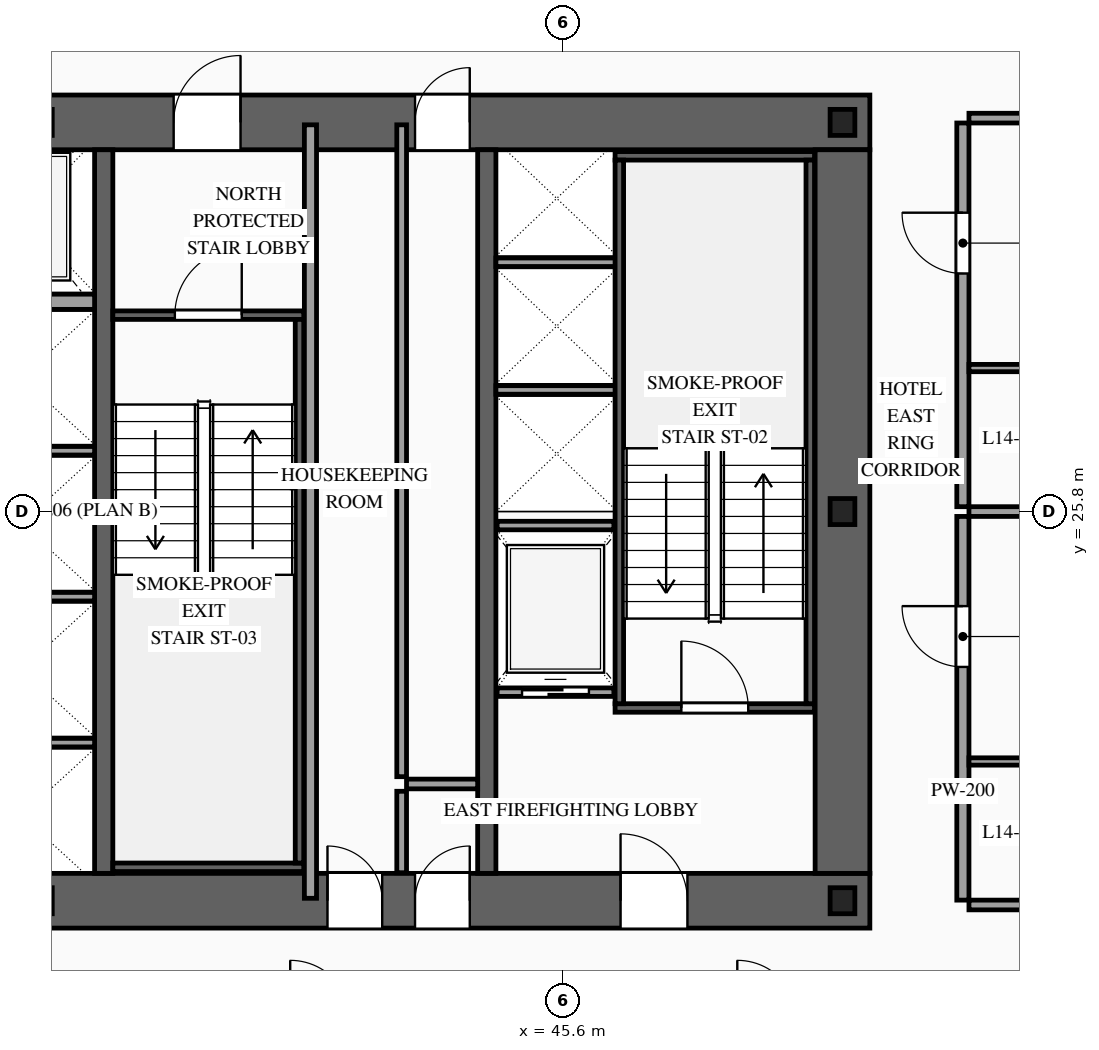
"""IFC4 building model, lengths in metres.
Left out: names, types, materials, properties, quantities, classifications, styles, units other than length and angle.
Written with IfcOpenShell. Run it as: python <this file> out.ifc"""

import sys

from ifc_helpers import new_model, si_unit, direction, frame, frame_2d, origin, origin_2d, place, context, subcontext, project, spatial, rectangle, i_section, extrude, source, transform, mapped, element, fill, save


model = new_model("IFC4")
c1 = context("Model", 3, precision=1e-05, world=origin(), true_north=direction((0.0, 1.0)))
c2 = subcontext(c1, "Body", "Model", "MODEL_VIEW")
j1 = project(units=[si_unit("LENGTHUNIT", "METRE"), si_unit("PLANEANGLEUNIT", "RADIAN")], contexts=[c1])
p1 = place(None, origin())
s1 = spatial("IfcSite", under=j1, at=p1, CompositionType="ELEMENT")
p2 = place(p1, origin())
s2 = spatial("IfcBuilding", under=s1, at=p2, CompositionType="ELEMENT")
p3 = place(p2, frame((0.0, 0.0, 56.8)))
s3 = spatial("IfcBuildingStorey", under=s2, at=p3, CompositionType="ELEMENT", Elevation=56.8)
p4 = place(p3, frame((23.35, 19.4, 0.0), z_axis=(0.0, 0.0, 1.0), x_axis=(1.0, 0.0, 0.0)))
e1 = element("IfcWall", 1, at=p4, inside=s3, PredefinedType="SHEAR", context=c2, shape_type="SweptSolid", body=[
    extrude(rectangle(XDim=27.3, YDim=0.9, at=frame_2d((13.65, 0.0))), origin(), (0.0, 0.0, 1.0), 3.6),
])
p5 = place(p4, frame((2.1, 0.0, 0.0)))
e2 = element("IfcOpeningElement", 2, at=p5, cuts=e1, PredefinedType="OPENING", context=c2, shape_type="SweptSolid", body=[
    extrude(rectangle(XDim=1.1, YDim=2.2, at=frame_2d((0.55, 1.1))), frame((0.0, 0.465, 0.0), z_axis=(0.0, -1.0, 0.0), x_axis=(1.0, 0.0, 0.0)), (0.0, 0.0, 1.0), 0.93),
])
p6 = place(p4, frame((10.0, 0.0, 0.0)))
e3 = element("IfcOpeningElement", 3, at=p6, cuts=e1, PredefinedType="OPENING", context=c2, shape_type="SweptSolid", body=[
    extrude(rectangle(XDim=1.1, YDim=2.2, at=frame_2d((0.55, 1.1))), frame((0.0, 0.465, 0.0), z_axis=(0.0, -1.0, 0.0), x_axis=(1.0, 0.0, 0.0)), (0.0, 0.0, 1.0), 0.93),
])
p7 = place(p4, frame((23.2, 0.0, 0.0)))
e4 = element("IfcOpeningElement", 4, at=p7, cuts=e1, PredefinedType="OPENING", context=c2, shape_type="SweptSolid", body=[
    extrude(rectangle(XDim=1.1, YDim=2.2, at=frame_2d((0.55, 1.1))), frame((0.0, 0.465, 0.0), z_axis=(0.0, -1.0, 0.0), x_axis=(1.0, 0.0, 0.0)), (0.0, 0.0, 1.0), 0.93),
])
p8 = place(p4, frame((19.82, 0.0, 0.0)))
e5 = element("IfcOpeningElement", 5, at=p8, cuts=e1, PredefinedType="OPENING", context=c2, shape_type="SweptSolid", body=[
    extrude(rectangle(XDim=0.9, YDim=2.15, at=frame_2d((0.45, 1.075))), frame((0.0, 0.465, 0.0), z_axis=(0.0, -1.0, 0.0), x_axis=(1.0, 0.0, 0.0)), (0.0, 0.0, 1.0), 0.93),
])
p9 = place(p4, frame((18.38, 0.0, 0.0)))
e6 = element("IfcOpeningElement", 6, at=p9, cuts=e1, PredefinedType="OPENING", context=c2, shape_type="SweptSolid", body=[
    extrude(rectangle(XDim=0.9, YDim=2.15, at=frame_2d((0.45, 1.075))), frame((0.0, 0.465, 0.0), z_axis=(0.0, -1.0, 0.0), x_axis=(1.0, 0.0, 0.0)), (0.0, 0.0, 1.0), 0.93),
])
p10 = place(p3, frame((23.35, 32.2, 0.0), z_axis=(0.0, 0.0, 1.0), x_axis=(1.0, 0.0, 0.0)))
e7 = element("IfcWall", 7, at=p10, inside=s3, PredefinedType="SHEAR", context=c2, shape_type="SweptSolid", body=[
    extrude(rectangle(XDim=27.3, YDim=0.9, at=frame_2d((13.65, 0.0))), origin(), (0.0, 0.0, 1.0), 3.6),
])
p11 = place(p10, frame((4.72, 0.0, 0.0)))
e8 = element("IfcOpeningElement", 8, at=p11, cuts=e7, PredefinedType="OPENING", context=c2, shape_type="SweptSolid", body=[
    extrude(rectangle(XDim=0.9, YDim=2.15, at=frame_2d((0.45, 1.075))), frame((0.0, 0.465, 0.0), z_axis=(0.0, -1.0, 0.0), x_axis=(1.0, 0.0, 0.0)), (0.0, 0.0, 1.0), 0.93),
])
p12 = place(p10, frame((10.0, 0.0, 0.0)))
e9 = element("IfcOpeningElement", 9, at=p12, cuts=e7, PredefinedType="OPENING", context=c2, shape_type="SweptSolid", body=[
    extrude(rectangle(XDim=1.1, YDim=2.2, at=frame_2d((0.55, 1.1))), frame((0.0, 0.465, 0.0), z_axis=(0.0, -1.0, 0.0), x_axis=(1.0, 0.0, 0.0)), (0.0, 0.0, 1.0), 0.93),
])
p13 = place(p10, frame((15.85, 0.0, 0.0)))
e10 = element("IfcOpeningElement", 10, at=p13, cuts=e7, PredefinedType="OPENING", context=c2, shape_type="SweptSolid", body=[
    extrude(rectangle(XDim=1.1, YDim=2.2, at=frame_2d((0.55, 1.1))), frame((0.0, 0.465, 0.0), z_axis=(0.0, -1.0, 0.0), x_axis=(1.0, 0.0, 0.0)), (0.0, 0.0, 1.0), 0.93),
])
p14 = place(p10, frame((19.82, 0.0, 0.0)))
e11 = element("IfcOpeningElement", 11, at=p14, cuts=e7, PredefinedType="OPENING", context=c2, shape_type="SweptSolid", body=[
    extrude(rectangle(XDim=0.9, YDim=2.15, at=frame_2d((0.45, 1.075))), frame((0.0, 0.465, 0.0), z_axis=(0.0, -1.0, 0.0), x_axis=(1.0, 0.0, 0.0)), (0.0, 0.0, 1.0), 0.93),
])
m1 = source(origin(), c2, "Body", "SweptSolid", [
    extrude(rectangle(XDim=11.9, YDim=0.9, at=frame_2d((5.95, 0.0))), origin(), (0.0, 0.0, 1.0), 3.6),
])
p15 = place(p3, frame((50.2, 19.85, 0.0), z_axis=(0.0, 0.0, 1.0), x_axis=(0.0, 1.0, 0.0)))
e12 = element("IfcWall", 12, at=p15, inside=s3, PredefinedType="SHEAR", context=c2, shape_type="MappedRepresentation", body=[
    mapped(m1, transform((0.0, 0.0, 0.0), scale=1.0)),
])
m2 = source(origin(), c2, "Body", "SweptSolid", [
    extrude(rectangle(XDim=11.9, YDim=0.3, at=frame_2d((5.95, 0.0))), origin(), (0.0, 0.0, 1.0), 3.6),
])
for number, where, z_axis, x_axis in (
    (13, (38.05, 19.85, 0.0), (0.0, 0.0, 1.0), (0.0, 1.0, 0.0)),
    (14, (44.35, 19.85, 0.0), (0.0, 0.0, 1.0), (0.0, 1.0, 0.0)),
):
    element("IfcWall", number, at=place(p3, frame(where, z_axis=z_axis, x_axis=x_axis)), inside=s3, PredefinedType="SOLIDWALL", context=c2, shape_type="MappedRepresentation", body=[
        mapped(m2, transform((0.0, 0.0, 0.0), scale=1.0)),
    ])
m3 = source(origin(), c2, "Body", "SweptSolid", [
    extrude(i_section(OverallWidth=0.407, OverallDepth=0.428, WebThickness=0.02, FlangeThickness=0.035, at=origin_2d()), origin(), (0.0, 0.0, 1.0), 3.6),
])
for number, where, z_axis, x_axis in (
    (15, (37.0, 19.4, 0.0), (0.0, 0.0, 1.0), (1.0, 0.0, 0.0)),
    (16, (50.2, 19.4, 0.0), (0.0, 0.0, 1.0), (1.0, 0.0, 0.0)),
    (17, (50.2, 25.8, 0.0), (0.0, 0.0, 1.0), (1.0, 0.0, 0.0)),
    (18, (37.0, 32.2, 0.0), (0.0, 0.0, 1.0), (1.0, 0.0, 0.0)),
    (19, (50.2, 32.2, 0.0), (0.0, 0.0, 1.0), (1.0, 0.0, 0.0)),
):
    element("IfcColumn", number, at=place(p3, frame(where, z_axis=z_axis, x_axis=x_axis)), inside=s3, PredefinedType="COLUMN", context=c2, shape_type="MappedRepresentation", body=[
        mapped(m3, transform((0.0, 0.0, 0.0), scale=1.0)),
    ])
p16 = place(p3, frame((44.52, 22.83, 0.0), z_axis=(0.0, 0.0, 1.0), x_axis=(1.0, 0.0, 0.0)))
e20 = element("IfcWall", 20, at=p16, inside=s3, PredefinedType="SOLIDWALL", context=c2, shape_type="SweptSolid", body=[
    extrude(rectangle(XDim=1.92, YDim=0.14, at=frame_2d((0.96, 0.0))), origin(), (0.0, 0.0, 1.0), 3.38),
])
p17 = place(p16, frame((0.41, 0.0, 0.0)))
e21 = element("IfcOpeningElement", 21, at=p17, cuts=e20, PredefinedType="OPENING", context=c2, shape_type="SweptSolid", body=[
    extrude(rectangle(XDim=1.1, YDim=2.2, at=frame_2d((0.55, 1.1))), frame((0.0, 0.085, 0.0), z_axis=(0.0, -1.0, 0.0), x_axis=(1.0, 0.0, 0.0)), (0.0, 0.0, 1.0), 0.17),
])
m4 = source(origin(), c2, "Body", "SweptSolid", [
    extrude(rectangle(XDim=1.92, YDim=0.14, at=frame_2d((0.96, 0.0))), origin(), (0.0, 0.0, 1.0), 3.38),
])
p18 = place(p3, frame((44.52, 25.57, 0.0), z_axis=(0.0, 0.0, 1.0), x_axis=(1.0, 0.0, 0.0)))
e22 = element("IfcWall", 22, at=p18, inside=s3, PredefinedType="SOLIDWALL", context=c2, shape_type="MappedRepresentation", body=[
    mapped(m4, transform((0.0, 0.0, 0.0), scale=1.0)),
])
m5 = source(origin(), c2, "Body", "SweptSolid", [
    extrude(rectangle(XDim=2.4, YDim=0.14, at=frame_2d((1.2, 0.0))), origin(), (0.0, 0.0, 1.0), 3.38),
])
for number, where, z_axis, x_axis in (
    (23, (35.5, 22.0, 0.0), (0.0, 0.0, 1.0), (1.0, 0.0, 0.0)),
    (24, (35.5, 24.4, 0.0), (0.0, 0.0, 1.0), (1.0, 0.0, 0.0)),
    (25, (35.5, 26.8, 0.0), (0.0, 0.0, 1.0), (1.0, 0.0, 0.0)),
):
    element("IfcWall", number, at=place(p3, frame(where, z_axis=z_axis, x_axis=x_axis)), inside=s3, PredefinedType="SOLIDWALL", context=c2, shape_type="MappedRepresentation", body=[
        mapped(m5, transform((0.0, 0.0, 0.0), scale=1.0)),
    ])
m6 = source(origin(), c2, "Body", "SweptSolid", [
    extrude(rectangle(XDim=2.4, YDim=0.25, at=frame_2d((1.2, 0.0))), origin(), (0.0, 0.0, 1.0), 3.38),
])
p19 = place(p3, frame((35.5, 29.25, 0.0), z_axis=(0.0, 0.0, 1.0), x_axis=(1.0, 0.0, 0.0)))
e26 = element("IfcWall", 26, at=p19, inside=s3, PredefinedType="SOLIDWALL", context=c2, shape_type="MappedRepresentation", body=[
    mapped(m6, transform((0.0, 0.0, 0.0), scale=1.0)),
])
m7 = source(origin(), c2, "Body", "SweptSolid", [
    extrude(rectangle(XDim=2.0, YDim=0.14, at=frame_2d((1.0, 0.0))), origin(), (0.0, 0.0, 1.0), 3.38),
])
for number, where, z_axis, x_axis in (
    (27, (44.5, 27.8, 0.0), (0.0, 0.0, 1.0), (1.0, 0.0, 0.0)),
    (28, (44.5, 29.9, 0.0), (0.0, 0.0, 1.0), (1.0, 0.0, 0.0)),
):
    element("IfcWall", number, at=place(p3, frame(where, z_axis=z_axis, x_axis=x_axis)), inside=s3, PredefinedType="SOLIDWALL", context=c2, shape_type="MappedRepresentation", body=[
        mapped(m7, transform((0.0, 0.0, 0.0), scale=1.0)),
    ])
p20 = place(p3, frame((46.46, 22.57, 0.0), z_axis=(0.0, 0.0, 1.0), x_axis=(1.0, 0.0, 0.0)))
e29 = element("IfcWall", 29, at=p20, inside=s3, PredefinedType="SOLIDWALL", context=c2, shape_type="SweptSolid", body=[
    extrude(rectangle(XDim=3.28, YDim=0.14, at=frame_2d((1.64, 0.0))), origin(), (0.0, 0.0, 1.0), 3.38),
])
p21 = place(p20, frame((1.09, 0.0, 0.0)))
e30 = element("IfcOpeningElement", 30, at=p21, cuts=e29, PredefinedType="OPENING", context=c2, shape_type="SweptSolid", body=[
    extrude(rectangle(XDim=1.1, YDim=2.2, at=frame_2d((0.55, 1.1))), frame((0.0, 0.085, 0.0), z_axis=(0.0, -1.0, 0.0), x_axis=(1.0, 0.0, 0.0)), (0.0, 0.0, 1.0), 0.17),
])
m8 = source(origin(), c2, "Body", "SweptSolid", [
    extrude(rectangle(XDim=3.28, YDim=0.14, at=frame_2d((1.64, 0.0))), origin(), (0.0, 0.0, 1.0), 3.38),
])
p22 = place(p3, frame((46.46, 31.65, 0.0), z_axis=(0.0, 0.0, 1.0), x_axis=(1.0, 0.0, 0.0)))
e31 = element("IfcWall", 31, at=p22, inside=s3, PredefinedType="SOLIDWALL", context=c2, shape_type="MappedRepresentation", body=[
    mapped(m8, transform((0.0, 0.0, 0.0), scale=1.0)),
])
m9 = source(origin(), c2, "Body", "SweptSolid", [
    extrude(rectangle(XDim=8.94, YDim=0.14, at=frame_2d((4.47, 0.0))), origin(), (0.0, 0.0, 1.0), 3.38),
])
for number, where, z_axis, x_axis in (
    (32, (46.53, 22.64, 0.0), (0.0, 0.0, 1.0), (0.0, 1.0, 0.0)),
    (33, (49.67, 22.64, 0.0), (0.0, 0.0, 1.0), (0.0, 1.0, 0.0)),
):
    element("IfcWall", number, at=place(p3, frame(where, z_axis=z_axis, x_axis=x_axis)), inside=s3, PredefinedType="SOLIDWALL", context=c2, shape_type="MappedRepresentation", body=[
        mapped(m9, transform((0.0, 0.0, 0.0), scale=1.0)),
    ])
p23 = place(p3, frame((38.2, 29.03, 0.0), z_axis=(0.0, 0.0, 1.0), x_axis=(1.0, 0.0, 0.0)))
e34 = element("IfcWall", 34, at=p23, inside=s3, PredefinedType="SOLIDWALL", context=c2, shape_type="SweptSolid", body=[
    extrude(rectangle(XDim=3.14, YDim=0.14, at=frame_2d((1.57, 0.0))), origin(), (0.0, 0.0, 1.0), 3.38),
])
p24 = place(p23, frame((1.02, 0.0, 0.0)))
e35 = element("IfcOpeningElement", 35, at=p24, cuts=e34, PredefinedType="OPENING", context=c2, shape_type="SweptSolid", body=[
    extrude(rectangle(XDim=1.1, YDim=2.2, at=frame_2d((0.55, 1.1))), frame((0.0, 0.085, 0.0), z_axis=(0.0, -1.0, 0.0), x_axis=(1.0, 0.0, 0.0)), (0.0, 0.0, 1.0), 0.17),
])
m10 = source(origin(), c2, "Body", "SweptSolid", [
    extrude(rectangle(XDim=3.14, YDim=0.14, at=frame_2d((1.57, 0.0))), origin(), (0.0, 0.0, 1.0), 3.38),
])
p25 = place(p3, frame((38.2, 19.95, 0.0), z_axis=(0.0, 0.0, 1.0), x_axis=(1.0, 0.0, 0.0)))
e36 = element("IfcWall", 36, at=p25, inside=s3, PredefinedType="SOLIDWALL", context=c2, shape_type="MappedRepresentation", body=[
    mapped(m10, transform((0.0, 0.0, 0.0), scale=1.0)),
])
m11 = source(origin(), c2, "Body", "SweptSolid", [
    extrude(rectangle(XDim=8.94, YDim=0.14, at=frame_2d((4.47, 0.0))), origin(), (0.0, 0.0, 1.0), 3.38),
])
p26 = place(p3, frame((41.27, 20.02, 0.0), z_axis=(0.0, 0.0, 1.0), x_axis=(0.0, 1.0, 0.0)))
e37 = element("IfcWall", 37, at=p26, inside=s3, PredefinedType="SOLIDWALL", context=c2, shape_type="MappedRepresentation", body=[
    mapped(m11, transform((0.0, 0.0, 0.0), scale=1.0)),
])
m12 = source(origin(), c2, "Body", "SweptSolid", [
    extrude(rectangle(XDim=1.34, YDim=0.16, at=frame_2d((0.67, 0.0))), origin(), (0.0, 0.0, 1.0), 3.38),
])
p27 = place(p3, frame((42.95, 19.86, 0.0), z_axis=(0.0, 0.0, 1.0), x_axis=(0.0, 1.0, 0.0)))
e38 = element("IfcWall", 38, at=p27, inside=s3, PredefinedType="PARTITIONING", context=c2, shape_type="MappedRepresentation", body=[
    mapped(m12, transform((0.0, 0.0, 0.0), scale=1.0)),
])
m13 = source(origin(), c2, "Body", "SweptSolid", [
    extrude(rectangle(XDim=1.17, YDim=0.16, at=frame_2d((0.585, 0.0))), origin(), (0.0, 0.0, 1.0), 3.38),
])
p28 = place(p3, frame((43.03, 21.32, 0.0), z_axis=(0.0, 0.0, 1.0), x_axis=(1.0, 0.0, 0.0)))
e39 = element("IfcWall", 39, at=p28, inside=s3, PredefinedType="PARTITIONING", context=c2, shape_type="MappedRepresentation", body=[
    mapped(m13, transform((0.0, 0.0, 0.0), scale=1.0)),
])
m14 = source(origin(), c2, "Body", "SweptSolid", [
    extrude(rectangle(XDim=12.72, YDim=0.2, at=frame_2d((6.36, 0.0))), origin(), (0.0, 0.0, 1.0), 3.38),
])
p29 = place(p3, frame((41.45, 19.44, 0.0), z_axis=(0.0, 0.0, 1.0), x_axis=(0.0, 1.0, 0.0)))
e40 = element("IfcWall", 40, at=p29, inside=s3, PredefinedType="PARTITIONING", context=c2, shape_type="MappedRepresentation", body=[
    mapped(m14, transform((0.0, 0.0, 0.0), scale=1.0)),
])
m15 = source(origin(), c2, "Body", "SweptSolid", [
    extrude(rectangle(XDim=10.72, YDim=0.16, at=frame_2d((5.36, 0.0))), origin(), (0.0, 0.0, 1.0), 3.38),
])
p30 = place(p3, frame((42.95, 21.44, 0.0), z_axis=(0.0, 0.0, 1.0), x_axis=(0.0, 1.0, 0.0)))
e41 = element("IfcWall", 41, at=p30, inside=s3, PredefinedType="PARTITIONING", context=c2, shape_type="MappedRepresentation", body=[
    mapped(m15, transform((0.0, 0.0, 0.0), scale=1.0)),
])
p31 = place(p3, frame((52.18, 19.41, 0.0), z_axis=(0.0, 0.0, 1.0), x_axis=(0.0, 1.0, 0.0)))
e42 = element("IfcWall", 42, at=p31, inside=s3, PredefinedType="PARTITIONING", context=c2, shape_type="SweptSolid", body=[
    extrude(rectangle(XDim=6.31, YDim=0.2, at=frame_2d((3.155, 0.0))), origin(), (0.0, 0.0, 1.0), 3.38),
])
p32 = place(p31, frame((3.835, 0.0, 0.0)))
e43 = element("IfcOpeningElement", 43, at=p32, cuts=e42, PredefinedType="OPENING", context=c2, shape_type="SweptSolid", body=[
    extrude(rectangle(XDim=1.0, YDim=2.2, at=frame_2d((0.5, 1.1))), frame((0.0, 0.115, 0.0), z_axis=(0.0, -1.0, 0.0), x_axis=(1.0, 0.0, 0.0)), (0.0, 0.0, 1.0), 0.23),
])
m16 = source(origin(), c2, "Body", "SweptSolid", [
    extrude(rectangle(XDim=9.67, YDim=0.16, at=frame_2d((4.835, 0.0))), origin(), (0.0, 0.0, 1.0), 2.575),
])
p33 = place(p3, frame((52.28, 25.8, 0.0), z_axis=(0.0, 0.0, 1.0), x_axis=(1.0, 0.0, 0.0)))
e44 = element("IfcWall", 44, at=p33, inside=s3, PredefinedType="PARTITIONING", context=c2, shape_type="MappedRepresentation", body=[
    mapped(m16, transform((0.0, 0.0, 0.0), scale=1.0)),
])
m17 = source(origin(), c2, "Body", "SweptSolid", [
    extrude(rectangle(XDim=9.67, YDim=0.16, at=frame_2d((4.835, 0.0))), origin(), (0.0, 0.0, 1.0), 2.875),
])
p34 = place(p3, frame((52.28, 19.33, 0.0), z_axis=(0.0, 0.0, 1.0), x_axis=(1.0, 0.0, 0.0)))
e45 = element("IfcWall", 45, at=p34, inside=s3, PredefinedType="PARTITIONING", context=c2, shape_type="MappedRepresentation", body=[
    mapped(m17, transform((0.0, 0.0, 0.0), scale=1.0)),
])
m18 = source(origin(), c2, "Body", "SweptSolid", [
    extrude(rectangle(XDim=2.22, YDim=0.12, at=frame_2d((1.11, 0.0))), origin(), (0.0, 0.0, 1.0), 3.38),
])
p35 = place(p3, frame((52.28, 21.69, 0.0), z_axis=(0.0, 0.0, 1.0), x_axis=(1.0, 0.0, 0.0)))
e46 = element("IfcWall", 46, at=p35, inside=s3, PredefinedType="PARTITIONING", context=c2, shape_type="MappedRepresentation", body=[
    mapped(m18, transform((0.0, 0.0, 0.0), scale=1.0)),
])
p36 = place(p3, frame((52.18, 25.88, 0.0), z_axis=(0.0, 0.0, 1.0), x_axis=(0.0, 1.0, 0.0)))
e47 = element("IfcWall", 47, at=p36, inside=s3, PredefinedType="PARTITIONING", context=c2, shape_type="SweptSolid", body=[
    extrude(rectangle(XDim=6.31, YDim=0.2, at=frame_2d((3.155, 0.0))), origin(), (0.0, 0.0, 1.0), 3.38),
])
p37 = place(p36, frame((3.835, 0.0, 0.0)))
e48 = element("IfcOpeningElement", 48, at=p37, cuts=e47, PredefinedType="OPENING", context=c2, shape_type="SweptSolid", body=[
    extrude(rectangle(XDim=1.0, YDim=2.2, at=frame_2d((0.5, 1.1))), frame((0.0, 0.115, 0.0), z_axis=(0.0, -1.0, 0.0), x_axis=(1.0, 0.0, 0.0)), (0.0, 0.0, 1.0), 0.23),
])
p38 = place(p3, frame((52.28, 32.27, 0.0), z_axis=(0.0, 0.0, 1.0), x_axis=(1.0, 0.0, 0.0)))
e49 = element("IfcWall", 49, at=p38, inside=s3, PredefinedType="PARTITIONING", context=c2, shape_type="MappedRepresentation", body=[
    mapped(m17, transform((0.0, 0.0, 0.0), scale=1.0)),
])
p39 = place(p3, frame((52.28, 28.16, 0.0), z_axis=(0.0, 0.0, 1.0), x_axis=(1.0, 0.0, 0.0)))
e50 = element("IfcWall", 50, at=p39, inside=s3, PredefinedType="PARTITIONING", context=c2, shape_type="MappedRepresentation", body=[
    mapped(m18, transform((0.0, 0.0, 0.0), scale=1.0)),
])
m19 = source(origin(), c2, "Body", "SweptSolid", [
    extrude(rectangle(XDim=1.1, YDim=2.2, at=frame_2d((0.55, 1.1))), frame((0.0, 0.025, 0.0), z_axis=(0.0, -1.0, 0.0), x_axis=(1.0, 0.0, 0.0)), (0.0, 0.0, 1.0), 0.05),
])
p40 = place(p17, origin())
e51 = element("IfcDoor", 51, at=p40, inside=s3, OperationType="SLIDING_TO_RIGHT", PredefinedType="DOOR", context=c2, shape_type="MappedRepresentation", body=[
    mapped(m19, transform((0.0, 0.0, 0.0), scale=1.0)),
])
fill(e21, e51)
m20 = source(origin(), c2, "Body", "SweptSolid", [
    extrude(rectangle(XDim=1.1, YDim=2.2, at=frame_2d((0.55, 1.1))), frame((0.0, 0.025, 0.0), z_axis=(0.0, -1.0, 0.0), x_axis=(1.0, 0.0, 0.0)), (0.0, 0.0, 1.0), 0.05),
])
p41 = place(p21, origin())
e52 = element("IfcDoor", 52, at=p41, inside=s3, OperationType="SINGLE_SWING_LEFT", PredefinedType="DOOR", context=c2, shape_type="MappedRepresentation", body=[
    mapped(m20, transform((0.0, 0.0, 0.0), scale=1.0)),
])
fill(e30, e52)
p42 = place(p24, origin())
e53 = element("IfcDoor", 53, at=p42, inside=s3, OperationType="SINGLE_SWING_RIGHT", PredefinedType="DOOR", context=c2, shape_type="MappedRepresentation", body=[
    mapped(m20, transform((0.0, 0.0, 0.0), scale=1.0)),
])
fill(e35, e53)
p43 = place(p7, origin())
e54 = element("IfcDoor", 54, at=p43, inside=s3, OperationType="SINGLE_SWING_LEFT", PredefinedType="DOOR", context=c2, shape_type="MappedRepresentation", body=[
    mapped(m20, transform((0.0, 0.0, 0.0), scale=1.0)),
])
fill(e4, e54)
p44 = place(p13, origin())
e55 = element("IfcDoor", 55, at=p44, inside=s3, OperationType="SINGLE_SWING_RIGHT", PredefinedType="DOOR", context=c2, shape_type="MappedRepresentation", body=[
    mapped(m20, transform((0.0, 0.0, 0.0), scale=1.0)),
])
fill(e10, e55)
m21 = source(origin(), c2, "Body", "SweptSolid", [
    extrude(rectangle(XDim=0.9, YDim=2.15, at=frame_2d((0.45, 1.075))), frame((0.0, 0.025, 0.0), z_axis=(0.0, -1.0, 0.0), x_axis=(1.0, 0.0, 0.0)), (0.0, 0.0, 1.0), 0.05),
])
p45 = place(p8, origin())
e56 = element("IfcDoor", 56, at=p45, inside=s3, OperationType="SINGLE_SWING_RIGHT", PredefinedType="DOOR", context=c2, shape_type="MappedRepresentation", body=[
    mapped(m21, transform((0.0, 0.0, 0.0), scale=1.0)),
])
fill(e5, e56)
p46 = place(p9, origin())
e57 = element("IfcDoor", 57, at=p46, inside=s3, OperationType="SINGLE_SWING_LEFT", PredefinedType="DOOR", context=c2, shape_type="MappedRepresentation", body=[
    mapped(m21, transform((0.0, 0.0, 0.0), scale=1.0)),
])
fill(e6, e57)
p47 = place(p14, origin())
e58 = element("IfcDoor", 58, at=p47, inside=s3, OperationType="SINGLE_SWING_RIGHT", PredefinedType="DOOR", context=c2, shape_type="MappedRepresentation", body=[
    mapped(m21, transform((0.0, 0.0, 0.0), scale=1.0)),
])
fill(e11, e58)
m22 = source(origin(), c2, "Body", "SweptSolid", [
    extrude(rectangle(XDim=1.0, YDim=2.2, at=frame_2d((0.5, 1.1))), frame((0.0, 0.025, 0.0), z_axis=(0.0, -1.0, 0.0), x_axis=(1.0, 0.0, 0.0)), (0.0, 0.0, 1.0), 0.05),
])
p48 = place(p32, origin())
e59 = element("IfcDoor", 59, at=p48, inside=s3, OperationType="SINGLE_SWING_RIGHT", PredefinedType="DOOR", context=c2, shape_type="MappedRepresentation", body=[
    mapped(m22, transform((0.0, 0.0, 0.0), scale=1.0)),
])
fill(e43, e59)
p49 = place(p37, origin())
e60 = element("IfcDoor", 60, at=p49, inside=s3, OperationType="SINGLE_SWING_RIGHT", PredefinedType="DOOR", context=c2, shape_type="MappedRepresentation", body=[
    mapped(m22, transform((0.0, 0.0, 0.0), scale=1.0)),
])
fill(e48, e60)
save(model, sys.argv[1])
